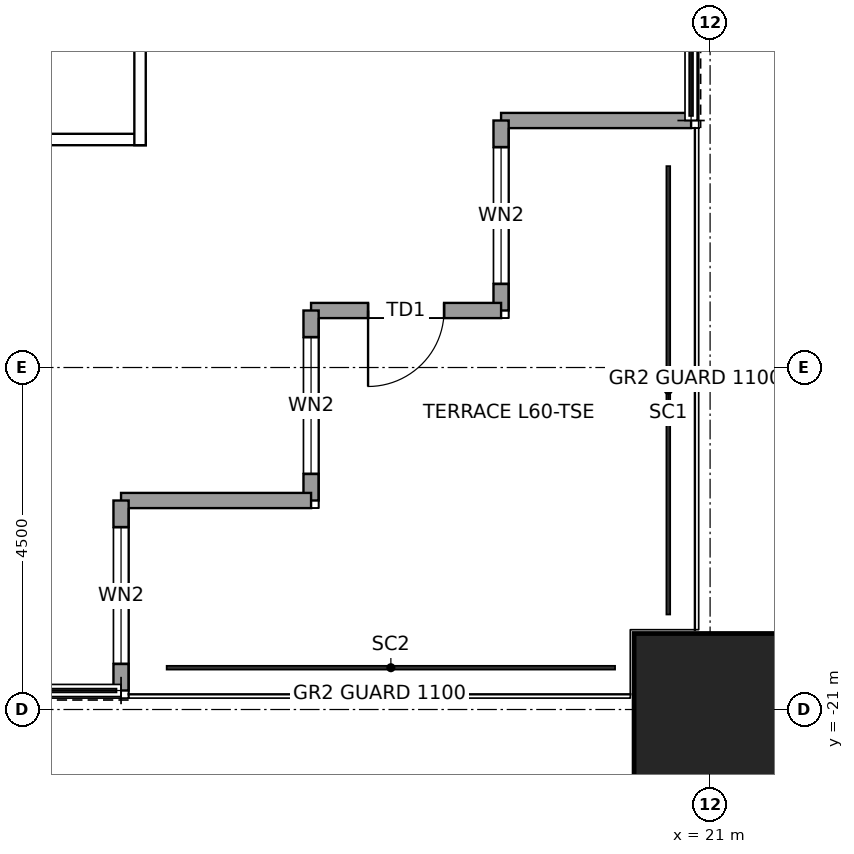
"""IFC4 building model, lengths in metres.
Left out: names, types, materials, properties, quantities, classifications, styles, units other than length and angle.
Written with IfcOpenShell. Run it as: python <this file> out.ifc"""

import sys

from ifc_helpers import new_model, si_unit, direction, frame, frame_2d, origin, origin_2d, place, context, subcontext, project, spatial, rectangle, hollow_rectangle, extrude, element, fill, save


model = new_model("IFC4")
c1 = context("Model", 3, precision=1e-05, world=origin(), true_north=direction((0.0, 1.0)))
c2 = subcontext(c1, "Body", "Model", "MODEL_VIEW")
j1 = project(units=[si_unit("LENGTHUNIT", "METRE"), si_unit("PLANEANGLEUNIT", "RADIAN")], contexts=[c1])
p1 = place(None, origin())
s1 = spatial("IfcSite", under=j1, at=p1, CompositionType="ELEMENT")
p2 = place(p1, origin())
s2 = spatial("IfcBuilding", under=s1, at=p2, CompositionType="ELEMENT")
p3 = place(p2, frame((0.0, 0.0, 275.9)))
s3 = spatial("IfcBuildingStorey", under=s2, at=p3, CompositionType="ELEMENT", Elevation=275.9)
p4 = place(p3, frame((21.0, -21.0, 0.0), z_axis=(0.0, 0.0, 1.0), x_axis=(1.0, 0.0, 0.0)))
e1 = element("IfcColumn", 1, at=p4, inside=s3, PredefinedType="COLUMN", context=c2, shape_type="SweptSolid", body=[
    extrude(hollow_rectangle(XDim=2.0, YDim=2.0, WallThickness=0.095, at=origin_2d()), origin(), (0.0, 0.0, 1.0), 4.0),
])
p5 = place(p3, frame((20.75, -13.25, 0.0), z_axis=(0.0, 0.0, 1.0), x_axis=(-1.0, 0.0, 0.0)))
e2 = element("IfcWall", 2, at=p5, inside=s3, PredefinedType="SOLIDWALL", context=c2, shape_type="SweptSolid", body=[
    extrude(rectangle(XDim=2.5, YDim=0.2, at=frame_2d((1.25, 0.0))), origin(), (0.0, 0.0, 1.0), 3.85),
])
p6 = place(p3, frame((18.25, -13.25, 0.0), z_axis=(0.0, 0.0, 1.0), x_axis=(0.0, -1.0, 0.0)))
e3 = element("IfcWall", 3, at=p6, inside=s3, PredefinedType="SOLIDWALL", context=c2, shape_type="SweptSolid", body=[
    extrude(rectangle(XDim=2.5, YDim=0.2, at=frame_2d((1.25, 0.0))), origin(), (0.0, 0.0, 1.0), 3.85),
])
p7 = place(p6, frame((0.35, 0.0, 0.3)))
e4 = element("IfcOpeningElement", 4, at=p7, cuts=e3, PredefinedType="OPENING", context=c2, shape_type="SweptSolid", body=[
    extrude(rectangle(XDim=1.8, YDim=2.4, at=frame_2d((0.9, 1.2))), frame((0.0, 0.11, 0.0), z_axis=(0.0, -1.0, 0.0), x_axis=(1.0, 0.0, 0.0)), (0.0, 0.0, 1.0), 0.22),
])
p8 = place(p3, frame((18.25, -15.75, 0.0), z_axis=(0.0, 0.0, 1.0), x_axis=(-1.0, 0.0, 0.0)))
e5 = element("IfcWall", 5, at=p8, inside=s3, PredefinedType="SOLIDWALL", context=c2, shape_type="SweptSolid", body=[
    extrude(rectangle(XDim=2.5, YDim=0.2, at=frame_2d((1.25, 0.0))), origin(), (0.0, 0.0, 1.0), 3.317),
])
p9 = place(p8, frame((0.75, 0.0, 0.0)))
e6 = element("IfcOpeningElement", 6, at=p9, cuts=e5, PredefinedType="OPENING", context=c2, shape_type="SweptSolid", body=[
    extrude(rectangle(XDim=1.0, YDim=2.4, at=frame_2d((0.5, 1.2))), frame((0.0, 0.11, 0.0), z_axis=(0.0, -1.0, 0.0), x_axis=(1.0, 0.0, 0.0)), (0.0, 0.0, 1.0), 0.22),
])
p10 = place(p3, frame((15.75, -15.75, 0.0), z_axis=(0.0, 0.0, 1.0), x_axis=(0.0, -1.0, 0.0)))
e7 = element("IfcWall", 7, at=p10, inside=s3, PredefinedType="SOLIDWALL", context=c2, shape_type="SweptSolid", body=[
    extrude(rectangle(XDim=2.5, YDim=0.2, at=frame_2d((1.25, 0.0))), origin(), (0.0, 0.0, 1.0), 3.85),
])
p11 = place(p10, frame((0.35, 0.0, 0.3)))
e8 = element("IfcOpeningElement", 8, at=p11, cuts=e7, PredefinedType="OPENING", context=c2, shape_type="SweptSolid", body=[
    extrude(rectangle(XDim=1.8, YDim=2.4, at=frame_2d((0.9, 1.2))), frame((0.0, 0.11, 0.0), z_axis=(0.0, -1.0, 0.0), x_axis=(1.0, 0.0, 0.0)), (0.0, 0.0, 1.0), 0.22),
])
p12 = place(p3, frame((15.75, -18.25, 0.0), z_axis=(0.0, 0.0, 1.0), x_axis=(-1.0, 0.0, 0.0)))
e9 = element("IfcWall", 9, at=p12, inside=s3, PredefinedType="SOLIDWALL", context=c2, shape_type="SweptSolid", body=[
    extrude(rectangle(XDim=2.5, YDim=0.2, at=frame_2d((1.25, 0.0))), origin(), (0.0, 0.0, 1.0), 3.85),
])
p13 = place(p3, frame((13.25, -18.25, 0.0), z_axis=(0.0, 0.0, 1.0), x_axis=(0.0, -1.0, 0.0)))
e10 = element("IfcWall", 10, at=p13, inside=s3, PredefinedType="SOLIDWALL", context=c2, shape_type="SweptSolid", body=[
    extrude(rectangle(XDim=2.5, YDim=0.2, at=frame_2d((1.25, 0.0))), origin(), (0.0, 0.0, 1.0), 3.85),
])
p14 = place(p13, frame((0.35, 0.0, 0.3)))
e11 = element("IfcOpeningElement", 11, at=p14, cuts=e10, PredefinedType="OPENING", context=c2, shape_type="SweptSolid", body=[
    extrude(rectangle(XDim=1.8, YDim=2.4, at=frame_2d((0.9, 1.2))), frame((0.0, 0.11, 0.0), z_axis=(0.0, -1.0, 0.0), x_axis=(1.0, 0.0, 0.0)), (0.0, 0.0, 1.0), 0.22),
])
p15 = place(p3, frame((2.425, -13.5, 0.0), z_axis=(0.0, 0.0, 1.0), x_axis=(1.0, 0.0, 0.0)))
e12 = element("IfcWall", 12, at=p15, inside=s3, PredefinedType="PARTITIONING", context=c2, shape_type="SweptSolid", body=[
    extrude(rectangle(XDim=11.15, YDim=0.15, at=frame_2d((5.575, 0.0))), origin(), (0.0, 0.0, 1.0), 3.85),
])
p16 = place(p3, frame((13.5, -13.575, 0.0), z_axis=(0.0, 0.0, 1.0), x_axis=(0.0, 1.0, 0.0)))
e13 = element("IfcWall", 13, at=p16, inside=s3, PredefinedType="PARTITIONING", context=c2, shape_type="SweptSolid", body=[
    extrude(rectangle(XDim=27.15, YDim=0.15, at=frame_2d((13.575, 0.0))), origin(), (0.0, 0.0, 1.0), 3.85),
])
p17 = place(p7, origin())
e14 = element("IfcWindow", 14, at=p17, inside=s3, PartitioningType="SINGLE_PANEL", PredefinedType="WINDOW", context=c2, shape_type="SweptSolid", body=[
    extrude(rectangle(XDim=1.8, YDim=2.4, at=frame_2d((0.9, 1.2))), frame((0.0, 0.03, 0.0), z_axis=(0.0, -1.0, 0.0), x_axis=(1.0, 0.0, 0.0)), (0.0, 0.0, 1.0), 0.06),
])
fill(e4, e14)
p18 = place(p9, origin())
e15 = element("IfcDoor", 15, at=p18, inside=s3, OperationType="SINGLE_SWING_RIGHT", PredefinedType="DOOR", context=c2, shape_type="SweptSolid", body=[
    extrude(rectangle(XDim=1.0, YDim=2.4, at=frame_2d((0.5, 1.2))), frame((0.0, 0.025, 0.0), z_axis=(0.0, -1.0, 0.0), x_axis=(1.0, 0.0, 0.0)), (0.0, 0.0, 1.0), 0.05),
])
fill(e6, e15)
p19 = place(p11, origin())
e16 = element("IfcWindow", 16, at=p19, inside=s3, PartitioningType="SINGLE_PANEL", PredefinedType="WINDOW", context=c2, shape_type="SweptSolid", body=[
    extrude(rectangle(XDim=1.8, YDim=2.4, at=frame_2d((0.9, 1.2))), frame((0.0, 0.03, 0.0), z_axis=(0.0, -1.0, 0.0), x_axis=(1.0, 0.0, 0.0)), (0.0, 0.0, 1.0), 0.06),
])
fill(e8, e16)
p20 = place(p14, origin())
e17 = element("IfcWindow", 17, at=p20, inside=s3, PartitioningType="SINGLE_PANEL", PredefinedType="WINDOW", context=c2, shape_type="SweptSolid", body=[
    extrude(rectangle(XDim=1.8, YDim=2.4, at=frame_2d((0.9, 1.2))), frame((0.0, 0.03, 0.0), z_axis=(0.0, -1.0, 0.0), x_axis=(1.0, 0.0, 0.0)), (0.0, 0.0, 1.0), 0.06),
])
fill(e11, e17)
save(model, sys.argv[1])
